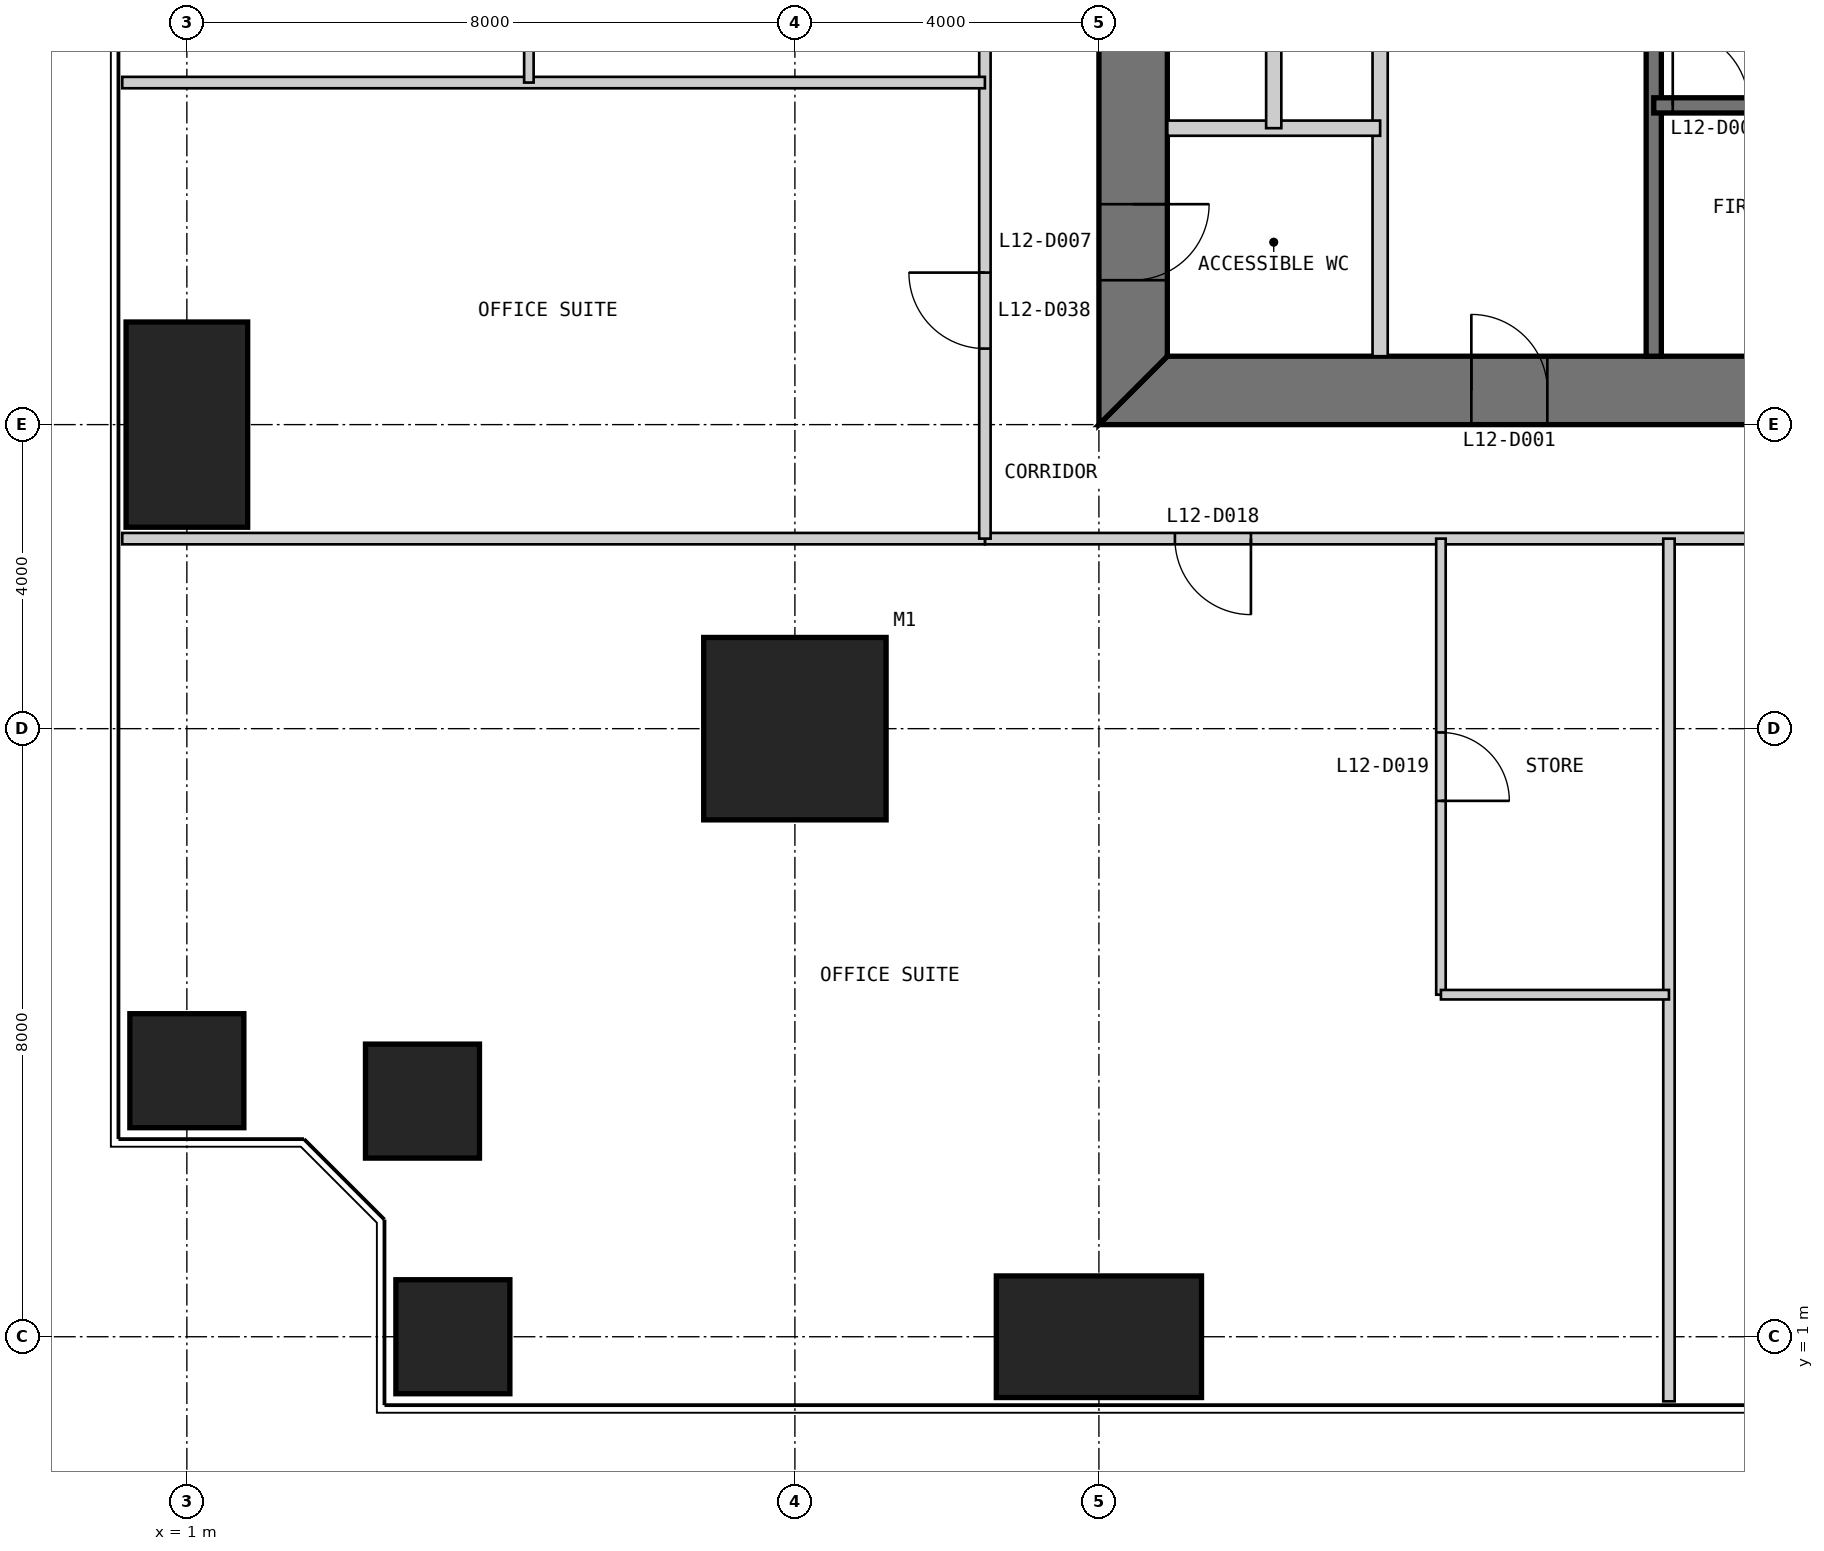
"""IFC4 building model, lengths in metres.
Left out: names, types, materials, properties, quantities, classifications, styles, units other than length and angle.
Written with IfcOpenShell. Run it as: python <this file> out.ifc"""

import sys

from ifc_helpers import new_model, si_unit, direction, frame, frame_2d, origin, origin_2d, place, context, subcontext, project, spatial, polyline, rectangle, outline, extrude, element, fill, save


model = new_model("IFC4")
c1 = context("Model", 3, precision=1e-05, world=origin(), true_north=direction((0.0, 1.0)))
c2 = subcontext(c1, "Body", "Model", "MODEL_VIEW")
j1 = project(units=[si_unit("LENGTHUNIT", "METRE"), si_unit("PLANEANGLEUNIT", "RADIAN")], contexts=[c1])
p1 = place(None, origin())
s1 = spatial("IfcSite", under=j1, at=p1, CompositionType="ELEMENT")
p2 = place(p1, origin())
s2 = spatial("IfcBuilding", under=s1, at=p2, CompositionType="ELEMENT")
p3 = place(p2, frame((0.0, 0.0, 55.0)))
s3 = spatial("IfcBuildingStorey", under=s2, at=p3, CompositionType="ELEMENT", Elevation=55.0)
p4 = place(p3, frame((9.0, 9.0, 0.0), z_axis=(0.0, 0.0, 1.0), x_axis=(1.0, 0.0, 0.0)))
e1 = element("IfcColumn", 1, at=p4, inside=s3, PredefinedType="COLUMN", context=c2, shape_type="SweptSolid", body=[
    extrude(rectangle(XDim=2.4, YDim=2.4, at=origin_2d()), origin(), (0.0, 0.0, 1.0), 4.0),
])
p5 = place(p3, frame((4.5, 1.0, 0.0), z_axis=(0.0, 0.0, 1.0), x_axis=(1.0, 0.0, 0.0)))
e2 = element("IfcColumn", 2, at=p5, inside=s3, PredefinedType="COLUMN", context=c2, shape_type="SweptSolid", body=[
    extrude(rectangle(XDim=1.5, YDim=1.5, at=origin_2d()), origin(), (0.0, 0.0, 1.0), 4.0),
])
p6 = place(p3, frame((13.0, 1.0, 0.0), z_axis=(0.0, 0.0, 1.0), x_axis=(1.0, 0.0, 0.0)))
e3 = element("IfcColumn", 3, at=p6, inside=s3, PredefinedType="COLUMN", context=c2, shape_type="SweptSolid", body=[
    extrude(rectangle(XDim=2.7, YDim=1.6, at=origin_2d()), origin(), (0.0, 0.0, 1.0), 4.0),
])
p7 = place(p3, frame((1.0, 13.0, 0.0), z_axis=(0.0, 0.0, 1.0), x_axis=(1.0, 0.0, 0.0)))
e4 = element("IfcColumn", 4, at=p7, inside=s3, PredefinedType="COLUMN", context=c2, shape_type="SweptSolid", body=[
    extrude(rectangle(XDim=1.6, YDim=2.7, at=origin_2d()), origin(), (0.0, 0.0, 1.0), 4.0),
])
for number, where, z_axis, x_axis in (
    (5, (1.0, 4.5, 0.0), (0.0, 0.0, 1.0), (1.0, 0.0, 0.0)),
    (6, (4.1, 4.1, 0.0), (0.0, 0.0, 1.0), (1.0, 0.0, 0.0)),
):
    element("IfcColumn", number, at=place(p3, frame(where, z_axis=z_axis, x_axis=x_axis)), inside=s3, PredefinedType="COLUMN", context=c2, shape_type="SweptSolid", body=[
        extrude(rectangle(XDim=1.5, YDim=1.5, at=origin_2d()), origin(), (0.0, 0.0, 1.0), 4.0),
    ])
p8 = place(p3, frame((13.0, 13.45, 0.0), z_axis=(0.0, 0.0, 1.0), x_axis=(1.0, 0.0, 0.0)))
e7 = element("IfcWall", 7, at=p8, inside=s3, PredefinedType="SHEAR", context=c2, shape_type="SweptSolid", body=[
    extrude(outline(polyline([(0.0, -0.45), (24.0, -0.45), (23.1, 0.45), (0.9, 0.45), (0.0, -0.45)])), origin(), (0.0, 0.0, 1.0), 4.0),
])
p9 = place(p8, frame((4.9, 0.0, 0.0)))
e8 = element("IfcOpeningElement", 8, at=p9, cuts=e7, PredefinedType="OPENING", context=c2, shape_type="SweptSolid", body=[
    extrude(rectangle(XDim=1.0, YDim=2.2, at=frame_2d((0.5, 1.1))), frame((0.0, 0.46, 0.0), z_axis=(0.0, -1.0, 0.0), x_axis=(1.0, 0.0, 0.0)), (0.0, 0.0, 1.0), 0.92),
])
p10 = place(p8, frame((8.9, 0.0, 0.0)))
e9 = element("IfcOpeningElement", 9, at=p10, cuts=e7, PredefinedType="OPENING", context=c2, shape_type="SweptSolid", body=[
    extrude(rectangle(XDim=1.1, YDim=2.2, at=frame_2d((0.55, 1.1))), frame((0.0, 0.46, 0.0), z_axis=(0.0, -1.0, 0.0), x_axis=(1.0, 0.0, 0.0)), (0.0, 0.0, 1.0), 0.92),
])
p11 = place(p8, frame((15.05, 0.0, 0.0)))
e10 = element("IfcOpeningElement", 10, at=p11, cuts=e7, PredefinedType="OPENING", context=c2, shape_type="SweptSolid", body=[
    extrude(rectangle(XDim=0.9, YDim=2.2, at=frame_2d((0.45, 1.1))), frame((0.0, 0.46, 0.0), z_axis=(0.0, -1.0, 0.0), x_axis=(1.0, 0.0, 0.0)), (0.0, 0.0, 1.0), 0.92),
])
p12 = place(p8, frame((17.9, 0.0, 0.0)))
e11 = element("IfcOpeningElement", 11, at=p12, cuts=e7, PredefinedType="OPENING", context=c2, shape_type="SweptSolid", body=[
    extrude(rectangle(XDim=1.0, YDim=2.2, at=frame_2d((0.5, 1.1))), frame((0.0, 0.46, 0.0), z_axis=(0.0, -1.0, 0.0), x_axis=(1.0, 0.0, 0.0)), (0.0, 0.0, 1.0), 0.92),
])
p13 = place(p8, frame((21.4, 0.0, 0.0)))
e12 = element("IfcOpeningElement", 12, at=p13, cuts=e7, PredefinedType="OPENING", context=c2, shape_type="SweptSolid", body=[
    extrude(rectangle(XDim=1.0, YDim=2.2, at=frame_2d((0.5, 1.1))), frame((0.0, 0.46, 0.0), z_axis=(0.0, -1.0, 0.0), x_axis=(1.0, 0.0, 0.0)), (0.0, 0.0, 1.0), 0.92),
])
p14 = place(p3, frame((13.45, 36.1, 0.0), z_axis=(0.0, 0.0, 1.0), x_axis=(0.0, -1.0, 0.0)))
e13 = element("IfcWall", 13, at=p14, inside=s3, PredefinedType="SHEAR", context=c2, shape_type="SweptSolid", body=[
    extrude(outline(polyline([(-0.9, -0.45), (23.1, -0.45), (22.2, 0.45), (0.0, 0.45), (-0.9, -0.45)])), origin(), (0.0, 0.0, 1.0), 4.0),
])
p15 = place(p14, frame((20.2, 0.0, 0.0)))
e14 = element("IfcOpeningElement", 14, at=p15, cuts=e13, PredefinedType="OPENING", context=c2, shape_type="SweptSolid", body=[
    extrude(rectangle(XDim=1.0, YDim=2.2, at=frame_2d((0.5, 1.1))), frame((0.0, 0.46, 0.0), z_axis=(0.0, -1.0, 0.0), x_axis=(1.0, 0.0, 0.0)), (0.0, 0.0, 1.0), 0.92),
])
p16 = place(p14, frame((17.25, 0.0, 0.0)))
e15 = element("IfcOpeningElement", 15, at=p16, cuts=e13, PredefinedType="OPENING", context=c2, shape_type="SweptSolid", body=[
    extrude(rectangle(XDim=0.9, YDim=2.2, at=frame_2d((0.45, 1.1))), frame((0.0, 0.46, 0.0), z_axis=(0.0, -1.0, 0.0), x_axis=(1.0, 0.0, 0.0)), (0.0, 0.0, 1.0), 0.92),
])
p17 = place(p3, frame((16.7, 13.9, 0.0), z_axis=(0.0, 0.0, 1.0), x_axis=(0.0, 1.0, 0.0)))
e16 = element("IfcWall", 16, at=p17, inside=s3, PredefinedType="PARTITIONING", context=c2, shape_type="SweptSolid", body=[
    extrude(rectangle(XDim=16.1, YDim=0.2, at=frame_2d((8.05, 0.0))), origin(), (0.0, 0.0, 1.0), 3.8),
])
p18 = place(p17, frame((4.1, 0.0, 0.0)))
e17 = element("IfcOpeningElement", 17, at=p18, cuts=e16, PredefinedType="OPENING", context=c2, shape_type="SweptSolid", body=[
    extrude(rectangle(XDim=0.9, YDim=2.2, at=frame_2d((0.45, 1.1))), frame((0.0, 0.11, 0.0), z_axis=(0.0, -1.0, 0.0), x_axis=(1.0, 0.0, 0.0)), (0.0, 0.0, 1.0), 0.22),
])
p19 = place(p17, frame((7.217, 0.0, 0.0)))
e18 = element("IfcOpeningElement", 18, at=p19, cuts=e16, PredefinedType="OPENING", context=c2, shape_type="SweptSolid", body=[
    extrude(rectangle(XDim=1.1, YDim=2.2, at=frame_2d((0.55, 1.1))), frame((0.0, 0.11, 0.0), z_axis=(0.0, -1.0, 0.0), x_axis=(1.0, 0.0, 0.0)), (0.0, 0.0, 1.0), 0.22),
])
p20 = place(p17, frame((10.55, 0.0, 0.0)))
e19 = element("IfcOpeningElement", 19, at=p20, cuts=e16, PredefinedType="OPENING", context=c2, shape_type="SweptSolid", body=[
    extrude(rectangle(XDim=1.1, YDim=2.2, at=frame_2d((0.55, 1.1))), frame((0.0, 0.11, 0.0), z_axis=(0.0, -1.0, 0.0), x_axis=(1.0, 0.0, 0.0)), (0.0, 0.0, 1.0), 0.22),
])
p21 = place(p17, frame((13.883, 0.0, 0.0)))
e20 = element("IfcOpeningElement", 20, at=p21, cuts=e16, PredefinedType="OPENING", context=c2, shape_type="SweptSolid", body=[
    extrude(rectangle(XDim=1.1, YDim=2.2, at=frame_2d((0.55, 1.1))), frame((0.0, 0.11, 0.0), z_axis=(0.0, -1.0, 0.0), x_axis=(1.0, 0.0, 0.0)), (0.0, 0.0, 1.0), 0.22),
])
p22 = place(p3, frame((20.3, 13.9, 0.0), z_axis=(0.0, 0.0, 1.0), x_axis=(0.0, 1.0, 0.0)))
e21 = element("IfcWall", 21, at=p22, inside=s3, PredefinedType="SOLIDWALL", context=c2, shape_type="SweptSolid", body=[
    extrude(rectangle(XDim=16.1, YDim=0.2, at=frame_2d((8.05, 0.0))), origin(), (0.0, 0.0, 1.0), 3.8),
])
p23 = place(p3, frame((20.3, 17.2, 0.0), z_axis=(0.0, 0.0, 1.0), x_axis=(1.0, 0.0, 0.0)))
e22 = element("IfcWall", 22, at=p23, inside=s3, PredefinedType="SOLIDWALL", context=c2, shape_type="SweptSolid", body=[
    extrude(rectangle(XDim=9.4, YDim=0.2, at=frame_2d((4.7, 0.0))), origin(), (0.0, 0.0, 1.0), 3.8),
])
p24 = place(p23, frame((0.25, 0.0, 0.0)))
e23 = element("IfcOpeningElement", 23, at=p24, cuts=e22, PredefinedType="OPENING", context=c2, shape_type="SweptSolid", body=[
    extrude(rectangle(XDim=1.0, YDim=2.2, at=frame_2d((0.5, 1.1))), frame((0.0, 0.11, 0.0), z_axis=(0.0, -1.0, 0.0), x_axis=(1.0, 0.0, 0.0)), (0.0, 0.0, 1.0), 0.22),
])
p25 = place(p3, frame((13.9, 16.9, 0.0), z_axis=(0.0, 0.0, 1.0), x_axis=(1.0, 0.0, 0.0)))
e24 = element("IfcWall", 24, at=p25, inside=s3, PredefinedType="PARTITIONING", context=c2, shape_type="SweptSolid", body=[
    extrude(rectangle(XDim=2.8, YDim=0.2, at=frame_2d((1.4, 0.0))), origin(), (0.0, 0.0, 1.0), 3.8),
])
p26 = place(p3, frame((15.3, 16.9, 0.0), z_axis=(0.0, 0.0, 1.0), x_axis=(0.0, 1.0, 0.0)))
e25 = element("IfcWall", 25, at=p26, inside=s3, PredefinedType="PARTITIONING", context=c2, shape_type="SweptSolid", body=[
    extrude(rectangle(XDim=3.1, YDim=0.2, at=frame_2d((1.55, 0.0))), origin(), (0.0, 0.0, 1.0), 3.8),
])
p27 = place(p3, frame((11.5, 11.5, 0.0), z_axis=(0.0, 0.0, 1.0), x_axis=(1.0, 0.0, 0.0)))
e26 = element("IfcWall", 26, at=p27, inside=s3, PredefinedType="PARTITIONING", context=c2, shape_type="SweptSolid", body=[
    extrude(rectangle(XDim=27.0, YDim=0.15, at=frame_2d((13.5, 0.0))), origin(), (0.0, 0.0, 1.0), 3.85),
])
p28 = place(p27, frame((2.5, 0.0, 0.0)))
e27 = element("IfcOpeningElement", 27, at=p28, cuts=e26, PredefinedType="OPENING", context=c2, shape_type="SweptSolid", body=[
    extrude(rectangle(XDim=1.0, YDim=2.2, at=frame_2d((0.5, 1.1))), frame((0.0, 0.085, 0.0), z_axis=(0.0, -1.0, 0.0), x_axis=(1.0, 0.0, 0.0)), (0.0, 0.0, 1.0), 0.17),
])
p29 = place(p27, frame((16.0, 0.0, 0.0)))
e28 = element("IfcOpeningElement", 28, at=p29, cuts=e26, PredefinedType="OPENING", context=c2, shape_type="SweptSolid", body=[
    extrude(rectangle(XDim=1.0, YDim=2.2, at=frame_2d((0.5, 1.1))), frame((0.0, 0.085, 0.0), z_axis=(0.0, -1.0, 0.0), x_axis=(1.0, 0.0, 0.0)), (0.0, 0.0, 1.0), 0.17),
])
p30 = place(p3, frame((0.15, 11.5, 0.0), z_axis=(0.0, 0.0, 1.0), x_axis=(1.0, 0.0, 0.0)))
e29 = element("IfcWall", 29, at=p30, inside=s3, PredefinedType="PARTITIONING", context=c2, shape_type="SweptSolid", body=[
    extrude(rectangle(XDim=11.35, YDim=0.15, at=frame_2d((5.675, 0.0))), origin(), (0.0, 0.0, 1.0), 3.85),
])
p31 = place(p3, frame((17.5, 5.5, 0.0), z_axis=(0.0, 0.0, 1.0), x_axis=(0.0, 1.0, 0.0)))
e30 = element("IfcWall", 30, at=p31, inside=s3, PredefinedType="PARTITIONING", context=c2, shape_type="SweptSolid", body=[
    extrude(rectangle(XDim=6.0, YDim=0.125, at=frame_2d((3.0, 0.0))), origin(), (0.0, 0.0, 1.0), 3.85),
])
p32 = place(p31, frame((2.55, 0.0, 0.0)))
e31 = element("IfcOpeningElement", 31, at=p32, cuts=e30, PredefinedType="OPENING", context=c2, shape_type="SweptSolid", body=[
    extrude(rectangle(XDim=0.9, YDim=2.2, at=frame_2d((0.45, 1.1))), frame((0.0, 0.073, 0.0), z_axis=(0.0, -1.0, 0.0), x_axis=(1.0, 0.0, 0.0)), (0.0, 0.0, 1.0), 0.145),
])
p33 = place(p3, frame((20.5, 0.15, 0.0), z_axis=(0.0, 0.0, 1.0), x_axis=(0.0, 1.0, 0.0)))
e32 = element("IfcWall", 32, at=p33, inside=s3, PredefinedType="PARTITIONING", context=c2, shape_type="SweptSolid", body=[
    extrude(rectangle(XDim=11.35, YDim=0.15, at=frame_2d((5.675, 0.0))), origin(), (0.0, 0.0, 1.0), 3.85),
])
p34 = place(p3, frame((17.5, 5.5, 0.0), z_axis=(0.0, 0.0, 1.0), x_axis=(1.0, 0.0, 0.0)))
e33 = element("IfcWall", 33, at=p34, inside=s3, PredefinedType="PARTITIONING", context=c2, shape_type="SweptSolid", body=[
    extrude(rectangle(XDim=3.0, YDim=0.125, at=frame_2d((1.5, 0.0))), origin(), (0.0, 0.0, 1.0), 3.85),
])
p35 = place(p3, frame((11.5, 38.5, 0.0), z_axis=(0.0, 0.0, 1.0), x_axis=(0.0, -1.0, 0.0)))
e34 = element("IfcWall", 34, at=p35, inside=s3, PredefinedType="PARTITIONING", context=c2, shape_type="SweptSolid", body=[
    extrude(rectangle(XDim=27.0, YDim=0.15, at=frame_2d((13.5, 0.0))), origin(), (0.0, 0.0, 1.0), 3.85),
])
p36 = place(p35, frame((2.5, 0.0, 0.0)))
e35 = element("IfcOpeningElement", 35, at=p36, cuts=e34, PredefinedType="OPENING", context=c2, shape_type="SweptSolid", body=[
    extrude(rectangle(XDim=1.0, YDim=2.2, at=frame_2d((0.5, 1.1))), frame((0.0, 0.085, 0.0), z_axis=(0.0, -1.0, 0.0), x_axis=(1.0, 0.0, 0.0)), (0.0, 0.0, 1.0), 0.17),
])
p37 = place(p35, frame((13.0, 0.0, 0.0)))
e36 = element("IfcOpeningElement", 36, at=p37, cuts=e34, PredefinedType="OPENING", context=c2, shape_type="SweptSolid", body=[
    extrude(rectangle(XDim=1.0, YDim=2.2, at=frame_2d((0.5, 1.1))), frame((0.0, 0.085, 0.0), z_axis=(0.0, -1.0, 0.0), x_axis=(1.0, 0.0, 0.0)), (0.0, 0.0, 1.0), 0.17),
])
p38 = place(p35, frame((23.5, 0.0, 0.0)))
e37 = element("IfcOpeningElement", 37, at=p38, cuts=e34, PredefinedType="OPENING", context=c2, shape_type="SweptSolid", body=[
    extrude(rectangle(XDim=1.0, YDim=2.2, at=frame_2d((0.5, 1.1))), frame((0.0, 0.085, 0.0), z_axis=(0.0, -1.0, 0.0), x_axis=(1.0, 0.0, 0.0)), (0.0, 0.0, 1.0), 0.17),
])
p39 = place(p3, frame((0.15, 17.5, 0.0), z_axis=(0.0, 0.0, 1.0), x_axis=(1.0, 0.0, 0.0)))
e38 = element("IfcWall", 38, at=p39, inside=s3, PredefinedType="PARTITIONING", context=c2, shape_type="SweptSolid", body=[
    extrude(rectangle(XDim=11.35, YDim=0.15, at=frame_2d((5.675, 0.0))), origin(), (0.0, 0.0, 1.0), 3.85),
])
p40 = place(p3, frame((5.5, 20.5, 0.0), z_axis=(0.0, 0.0, 1.0), x_axis=(0.0, -1.0, 0.0)))
e39 = element("IfcWall", 39, at=p40, inside=s3, PredefinedType="PARTITIONING", context=c2, shape_type="SweptSolid", body=[
    extrude(rectangle(XDim=3.0, YDim=0.125, at=frame_2d((1.5, 0.0))), origin(), (0.0, 0.0, 1.0), 3.85),
])
p41 = place(p9, origin())
e40 = element("IfcDoor", 40, at=p41, inside=s3, OperationType="SINGLE_SWING_LEFT", PredefinedType="DOOR", context=c2, shape_type="SweptSolid", body=[
    extrude(rectangle(XDim=1.0, YDim=2.2, at=frame_2d((0.5, 1.1))), frame((0.0, 0.025, 0.0), z_axis=(0.0, -1.0, 0.0), x_axis=(1.0, 0.0, 0.0)), (0.0, 0.0, 1.0), 0.05),
    extrude(outline(polyline([(0.0, 0.0), (0.04, 0.0), (0.04, 2.16), (0.96, 2.16), (0.96, 0.0), (1.0, 0.0), (1.0, 2.2), (0.0, 2.2), (0.0, 0.0)])), frame((0.0, 0.3, 0.0), z_axis=(0.0, -1.0, 0.0), x_axis=(1.0, 0.0, 0.0)), (0.0, 0.0, 1.0), 0.6),
])
fill(e8, e40)
p42 = place(p24, origin())
e41 = element("IfcDoor", 41, at=p42, inside=s3, OperationType="SINGLE_SWING_LEFT", PredefinedType="DOOR", context=c2, shape_type="SweptSolid", body=[
    extrude(rectangle(XDim=1.0, YDim=2.2, at=frame_2d((0.5, 1.1))), frame((0.0, 0.025, 0.0), z_axis=(0.0, -1.0, 0.0), x_axis=(1.0, 0.0, 0.0)), (0.0, 0.0, 1.0), 0.05),
])
fill(e23, e41)
p43 = place(p15, origin())
e42 = element("IfcDoor", 42, at=p43, inside=s3, OperationType="SINGLE_SWING_LEFT", PredefinedType="DOOR", context=c2, shape_type="SweptSolid", body=[
    extrude(rectangle(XDim=1.0, YDim=2.2, at=frame_2d((0.5, 1.1))), frame((0.0, 0.025, 0.0), z_axis=(0.0, -1.0, 0.0), x_axis=(1.0, 0.0, 0.0)), (0.0, 0.0, 1.0), 0.05),
    extrude(outline(polyline([(0.0, 0.0), (0.04, 0.0), (0.04, 2.16), (0.96, 2.16), (0.96, 0.0), (1.0, 0.0), (1.0, 2.2), (0.0, 2.2), (0.0, 0.0)])), frame((0.0, 0.3, 0.0), z_axis=(0.0, -1.0, 0.0), x_axis=(1.0, 0.0, 0.0)), (0.0, 0.0, 1.0), 0.6),
])
fill(e14, e42)
p44 = place(p28, frame((1.0, 0.0, 0.0), z_axis=(0.0, 0.0, 1.0), x_axis=(-1.0, 0.0, 0.0)))
e43 = element("IfcDoor", 43, at=p44, inside=s3, OperationType="SINGLE_SWING_LEFT", PredefinedType="DOOR", context=c2, shape_type="SweptSolid", body=[
    extrude(rectangle(XDim=1.0, YDim=2.2, at=frame_2d((0.5, 1.1))), frame((0.0, 0.025, 0.0), z_axis=(0.0, -1.0, 0.0), x_axis=(1.0, 0.0, 0.0)), (0.0, 0.0, 1.0), 0.05),
])
fill(e27, e43)
p45 = place(p32, frame((0.9, 0.0, 0.0), z_axis=(0.0, 0.0, 1.0), x_axis=(-1.0, 0.0, 0.0)))
e44 = element("IfcDoor", 44, at=p45, inside=s3, OperationType="SINGLE_SWING_RIGHT", PredefinedType="DOOR", context=c2, shape_type="SweptSolid", body=[
    extrude(rectangle(XDim=0.9, YDim=2.2, at=frame_2d((0.45, 1.1))), frame((0.0, 0.025, 0.0), z_axis=(0.0, -1.0, 0.0), x_axis=(1.0, 0.0, 0.0)), (0.0, 0.0, 1.0), 0.05),
])
fill(e31, e44)
p46 = place(p38, frame((1.0, 0.0, 0.0), z_axis=(0.0, 0.0, 1.0), x_axis=(-1.0, 0.0, 0.0)))
e45 = element("IfcDoor", 45, at=p46, inside=s3, OperationType="SINGLE_SWING_RIGHT", PredefinedType="DOOR", context=c2, shape_type="SweptSolid", body=[
    extrude(rectangle(XDim=1.0, YDim=2.2, at=frame_2d((0.5, 1.1))), frame((0.0, 0.025, 0.0), z_axis=(0.0, -1.0, 0.0), x_axis=(1.0, 0.0, 0.0)), (0.0, 0.0, 1.0), 0.05),
])
fill(e37, e45)
save(model, sys.argv[1])
